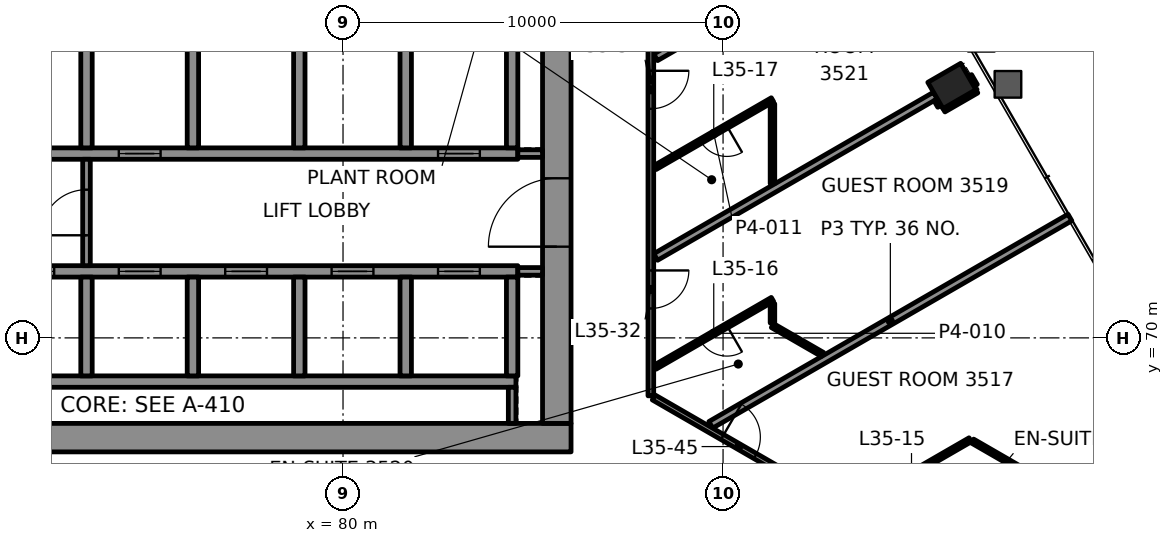
"""IFC4 building model, lengths in metres.
Left out: names, types, materials, properties, quantities, classifications, styles, units other than length and angle.
Written with IfcOpenShell. Run it as: python <this file> out.ifc"""

import sys

from ifc_helpers import new_model, si_unit, direction, frame, frame_2d, origin, origin_2d, place, context, subcontext, project, spatial, rectangle, hollow_rectangle, extrude, element, fill, save


model = new_model("IFC4")
c1 = context("Model", 3, precision=1e-05, world=origin(), true_north=direction((0.0, 1.0)))
c2 = subcontext(c1, "Body", "Model", "MODEL_VIEW")
j1 = project(units=[si_unit("LENGTHUNIT", "METRE"), si_unit("PLANEANGLEUNIT", "RADIAN")], contexts=[c1])
p1 = place(None, origin())
s1 = spatial("IfcSite", under=j1, at=p1, CompositionType="ELEMENT")
p2 = place(p1, origin())
s2 = spatial("IfcBuilding", under=s1, at=p2, CompositionType="ELEMENT")
p3 = place(p2, frame((0.0, 0.0, 155.8)))
s3 = spatial("IfcBuildingStorey", under=s2, at=p3, CompositionType="ELEMENT", Elevation=155.8)
p4 = place(p3, frame((96.021, 76.628, -0.0), z_axis=(0.0, 0.0, 1.0), x_axis=(-0.5, 0.866025403784, 0.0)))
e1 = element("IfcColumn", 1, at=p4, inside=s3, PredefinedType="COLUMN", context=c2, shape_type="SweptSolid", body=[
    extrude(hollow_rectangle(XDim=0.8, YDim=1.0, WallThickness=0.05, at=origin_2d()), origin(), (0.0, 0.0, 1.0), 3.9),
])
p5 = place(p3, frame((64.0, 67.375, 0.0), z_axis=(0.0, 0.0, 1.0), x_axis=(1.0, 0.0, 0.0)))
e2 = element("IfcWall", 2, at=p5, inside=s3, PredefinedType="SHEAR", context=c2, shape_type="SweptSolid", body=[
    extrude(rectangle(XDim=22.0, YDim=0.75, at=frame_2d((11.0, 0.0))), origin(), (0.0, 0.0, 1.0), 3.7),
])
p6 = place(p5, frame((3.15, 0.0, 0.0)))
e3 = element("IfcOpeningElement", 3, at=p6, cuts=e2, PredefinedType="OPENING", context=c2, shape_type="SweptSolid", body=[
    extrude(rectangle(XDim=0.9, YDim=2.1, at=frame_2d((0.45, 1.05))), frame((0.0, 0.385, 0.0), z_axis=(0.0, -1.0, 0.0), x_axis=(1.0, 0.0, 0.0)), (0.0, 0.0, 1.0), 0.77),
])
p7 = place(p3, frame((85.625, 67.75, 0.0), z_axis=(0.0, 0.0, 1.0), x_axis=(0.0, 1.0, 0.0)))
e4 = element("IfcWall", 4, at=p7, inside=s3, PredefinedType="SHEAR", context=c2, shape_type="SweptSolid", body=[
    extrude(rectangle(XDim=14.5, YDim=0.75, at=frame_2d((7.25, 0.0))), origin(), (0.0, 0.0, 1.0), 3.7),
])
p8 = place(p7, frame((4.65, 0.0, 0.0)))
e5 = element("IfcOpeningElement", 5, at=p8, cuts=e4, PredefinedType="OPENING", context=c2, shape_type="SweptSolid", body=[
    extrude(rectangle(XDim=1.8, YDim=2.1, at=frame_2d((0.9, 1.05))), frame((0.0, 0.385, 0.0), z_axis=(0.0, -1.0, 0.0), x_axis=(1.0, 0.0, 0.0)), (0.0, 0.0, 1.0), 0.77),
])
p9 = place(p7, frame((11.8, 0.0, 0.0)))
e6 = element("IfcOpeningElement", 6, at=p9, cuts=e4, PredefinedType="OPENING", context=c2, shape_type="SweptSolid", body=[
    extrude(rectangle(XDim=0.9, YDim=2.1, at=frame_2d((0.45, 1.05))), frame((0.0, 0.385, 0.0), z_axis=(0.0, -1.0, 0.0), x_axis=(1.0, 0.0, 0.0)), (0.0, 0.0, 1.0), 0.77),
])
p10 = place(p3, frame((70.35, 68.85, 0.0), z_axis=(0.0, 0.0, 1.0), x_axis=(1.0, 0.0, 0.0)))
e7 = element("IfcWall", 7, at=p10, inside=s3, PredefinedType="SHEAR", context=c2, shape_type="SweptSolid", body=[
    extrude(rectangle(XDim=14.2, YDim=0.3, at=frame_2d((7.1, 0.0))), origin(), (0.0, 0.0, 1.0), 3.7),
])
p11 = place(p3, frame((70.3, 71.75, 0.0), z_axis=(0.0, 0.0, 1.0), x_axis=(1.0, 0.0, 0.0)))
e8 = element("IfcWall", 8, at=p11, inside=s3, PredefinedType="SHEAR", context=c2, shape_type="SweptSolid", body=[
    extrude(rectangle(XDim=14.3, YDim=0.3, at=frame_2d((7.15, 0.0))), origin(), (0.0, 0.0, 1.0), 3.7),
])
p12 = place(p11, frame((1.0, 0.0, 0.0)))
e9 = element("IfcOpeningElement", 9, at=p12, cuts=e8, PredefinedType="OPENING", context=c2, shape_type="SweptSolid", body=[
    extrude(rectangle(XDim=1.1, YDim=2.1, at=frame_2d((0.55, 1.05))), frame((0.0, 0.16, 0.0), z_axis=(0.0, -1.0, 0.0), x_axis=(1.0, 0.0, 0.0)), (0.0, 0.0, 1.0), 0.32),
])
p13 = place(p11, frame((3.8, 0.0, 0.0)))
e10 = element("IfcOpeningElement", 10, at=p13, cuts=e8, PredefinedType="OPENING", context=c2, shape_type="SweptSolid", body=[
    extrude(rectangle(XDim=1.1, YDim=2.1, at=frame_2d((0.55, 1.05))), frame((0.0, 0.16, 0.0), z_axis=(0.0, -1.0, 0.0), x_axis=(1.0, 0.0, 0.0)), (0.0, 0.0, 1.0), 0.32),
])
p14 = place(p11, frame((6.6, 0.0, 0.0)))
e11 = element("IfcOpeningElement", 11, at=p14, cuts=e8, PredefinedType="OPENING", context=c2, shape_type="SweptSolid", body=[
    extrude(rectangle(XDim=1.1, YDim=2.1, at=frame_2d((0.55, 1.05))), frame((0.0, 0.16, 0.0), z_axis=(0.0, -1.0, 0.0), x_axis=(1.0, 0.0, 0.0)), (0.0, 0.0, 1.0), 0.32),
])
p15 = place(p11, frame((9.4, 0.0, 0.0)))
e12 = element("IfcOpeningElement", 12, at=p15, cuts=e8, PredefinedType="OPENING", context=c2, shape_type="SweptSolid", body=[
    extrude(rectangle(XDim=1.1, YDim=2.1, at=frame_2d((0.55, 1.05))), frame((0.0, 0.16, 0.0), z_axis=(0.0, -1.0, 0.0), x_axis=(1.0, 0.0, 0.0)), (0.0, 0.0, 1.0), 0.32),
])
p16 = place(p11, frame((12.2, 0.0, 0.0)))
e13 = element("IfcOpeningElement", 13, at=p16, cuts=e8, PredefinedType="OPENING", context=c2, shape_type="SweptSolid", body=[
    extrude(rectangle(XDim=1.1, YDim=2.1, at=frame_2d((0.55, 1.05))), frame((0.0, 0.16, 0.0), z_axis=(0.0, -1.0, 0.0), x_axis=(1.0, 0.0, 0.0)), (0.0, 0.0, 1.0), 0.32),
])
p17 = place(p3, frame((70.3, 74.85, 0.0), z_axis=(0.0, 0.0, 1.0), x_axis=(1.0, 0.0, 0.0)))
e14 = element("IfcWall", 14, at=p17, inside=s3, PredefinedType="SHEAR", context=c2, shape_type="SweptSolid", body=[
    extrude(rectangle(XDim=14.3, YDim=0.3, at=frame_2d((7.15, 0.0))), origin(), (0.0, 0.0, 1.0), 3.7),
])
p18 = place(p17, frame((3.8, 0.0, 0.0)))
e15 = element("IfcOpeningElement", 15, at=p18, cuts=e14, PredefinedType="OPENING", context=c2, shape_type="SweptSolid", body=[
    extrude(rectangle(XDim=1.1, YDim=2.1, at=frame_2d((0.55, 1.05))), frame((0.0, 0.16, 0.0), z_axis=(0.0, -1.0, 0.0), x_axis=(1.0, 0.0, 0.0)), (0.0, 0.0, 1.0), 0.32),
])
p19 = place(p17, frame((12.2, 0.0, 0.0)))
e16 = element("IfcOpeningElement", 16, at=p19, cuts=e14, PredefinedType="OPENING", context=c2, shape_type="SweptSolid", body=[
    extrude(rectangle(XDim=1.1, YDim=2.1, at=frame_2d((0.55, 1.05))), frame((0.0, 0.16, 0.0), z_axis=(0.0, -1.0, 0.0), x_axis=(1.0, 0.0, 0.0)), (0.0, 0.0, 1.0), 0.32),
])
for number, where, z_axis, x_axis in (
    (17, (73.25, 69.0, 0.0), (0.0, 0.0, 1.0), (0.0, 1.0, 0.0)),
    (18, (73.25, 75.0, 0.0), (0.0, 0.0, 1.0), (0.0, 1.0, 0.0)),
    (19, (76.05, 69.0, 0.0), (0.0, 0.0, 1.0), (0.0, 1.0, 0.0)),
    (20, (76.05, 75.0, 0.0), (0.0, 0.0, 1.0), (0.0, 1.0, 0.0)),
    (21, (78.85, 69.0, 0.0), (0.0, 0.0, 1.0), (0.0, 1.0, 0.0)),
    (22, (78.85, 75.0, 0.0), (0.0, 0.0, 1.0), (0.0, 1.0, 0.0)),
    (23, (81.65, 69.0, 0.0), (0.0, 0.0, 1.0), (0.0, 1.0, 0.0)),
    (24, (81.65, 75.0, 0.0), (0.0, 0.0, 1.0), (0.0, 1.0, 0.0)),
    (25, (84.45, 69.0, 0.0), (0.0, 0.0, 1.0), (0.0, 1.0, 0.0)),
    (26, (84.45, 75.0, 0.0), (0.0, 0.0, 1.0), (0.0, 1.0, 0.0)),
):
    element("IfcWall", number, at=place(p3, frame(where, z_axis=z_axis, x_axis=x_axis)), inside=s3, PredefinedType="SHEAR", context=c2, shape_type="SweptSolid", body=[
        extrude(rectangle(XDim=2.6, YDim=0.3, at=frame_2d((1.3, 0.0))), origin(), (0.0, 0.0, 1.0), 3.7),
    ])
p20 = place(p3, frame((96.502, 63.772, 0.0), z_axis=(0.0, 0.0, 1.0), x_axis=(0.866014709899, 0.500018521895, 0.0)))
e27 = element("IfcWall", 27, at=p20, inside=s3, PredefinedType="PARTITIONING", context=c2, shape_type="SweptSolid", body=[
    extrude(rectangle(XDim=6.971, YDim=0.2, at=frame_2d((3.486, 0.0))), origin(), (0.0, 0.0, 1.0), 3.1),
])
p21 = place(p3, frame((96.504, 67.319, 0.0), z_axis=(0.0, 0.0, 1.0), x_axis=(-0.866028357664, -0.499994883695, 0.0)))
e28 = element("IfcWall", 28, at=p21, inside=s3, PredefinedType="PARTITIONING", context=c2, shape_type="SweptSolid", body=[
    extrude(rectangle(XDim=3.568, YDim=0.12, at=frame_2d((1.784, 0.0))), origin(), (0.0, 0.0, 1.0), 3.1),
])
p22 = place(p21, frame((1.384, 0.0, 0.0)))
e29 = element("IfcOpeningElement", 29, at=p22, cuts=e28, PredefinedType="OPENING", context=c2, shape_type="SweptSolid", body=[
    extrude(rectangle(XDim=0.8, YDim=2.1, at=frame_2d((0.4, 1.05))), frame((0.0, 0.07, 0.0), z_axis=(0.0, -1.0, 0.0), x_axis=(1.0, 0.0, 0.0)), (0.0, 0.0, 1.0), 0.14),
])
p23 = place(p3, frame((89.677, 67.712, 0.0), z_axis=(0.0, 0.0, 1.0), x_axis=(0.866020529357, 0.500008442661, 0.0)))
e30 = element("IfcWall", 30, at=p23, inside=s3, PredefinedType="PARTITIONING", context=c2, shape_type="SweptSolid", body=[
    extrude(rectangle(XDim=10.912, YDim=0.2, at=frame_2d((5.456, 0.0))), origin(), (0.0, 0.0, 1.0), 2.865),
])
p24 = place(p3, frame((91.3, 71.013, 0.0), z_axis=(0.0, 0.0, 1.0), x_axis=(-0.866028357664, -0.499994883695, 0.0)))
e31 = element("IfcWall", 31, at=p24, inside=s3, PredefinedType="PARTITIONING", context=c2, shape_type="SweptSolid", body=[
    extrude(rectangle(XDim=3.568, YDim=0.12, at=frame_2d((1.784, 0.0))), origin(), (0.0, 0.0, 1.0), 3.1),
])
p25 = place(p24, frame((1.384, 0.0, 0.0)))
e32 = element("IfcOpeningElement", 32, at=p25, cuts=e31, PredefinedType="OPENING", context=c2, shape_type="SweptSolid", body=[
    extrude(rectangle(XDim=0.8, YDim=2.1, at=frame_2d((0.4, 1.05))), frame((0.0, 0.07, 0.0), z_axis=(0.0, -1.0, 0.0), x_axis=(1.0, 0.0, 0.0)), (0.0, 0.0, 1.0), 0.14),
])
p26 = place(p3, frame((95.788, 76.032, 0.0), z_axis=(0.0, 0.0, 1.0), x_axis=(0.866039090965, 0.499976292358, 0.0)))
e33 = element("IfcWall", 33, at=p26, inside=s3, PredefinedType="PARTITIONING", context=c2, shape_type="SweptSolid", body=[
    extrude(rectangle(XDim=0.999, YDim=0.2, at=frame_2d((0.5, 0.0))), origin(), (0.0, 0.0, 1.0), 2.865),
])
p27 = place(p3, frame((88.227, 72.129, 0.0), z_axis=(0.0, 0.0, 1.0), x_axis=(0.866037293988, 0.499979404997, 0.0)))
e34 = element("IfcWall", 34, at=p27, inside=s3, PredefinedType="PARTITIONING", context=c2, shape_type="SweptSolid", body=[
    extrude(rectangle(XDim=8.499, YDim=0.2, at=frame_2d((4.25, 0.0))), origin(), (0.0, 0.0, 1.0), 3.1),
])
p28 = place(p3, frame((91.3, 76.267, 0.0), z_axis=(0.0, 0.0, 1.0), x_axis=(-0.866028357664, -0.499994883695, 0.0)))
e35 = element("IfcWall", 35, at=p28, inside=s3, PredefinedType="PARTITIONING", context=c2, shape_type="SweptSolid", body=[
    extrude(rectangle(XDim=3.568, YDim=0.12, at=frame_2d((1.784, 0.0))), origin(), (0.0, 0.0, 1.0), 3.1),
])
p29 = place(p28, frame((1.384, 0.0, 0.0)))
e36 = element("IfcOpeningElement", 36, at=p29, cuts=e35, PredefinedType="OPENING", context=c2, shape_type="SweptSolid", body=[
    extrude(rectangle(XDim=0.8, YDim=2.1, at=frame_2d((0.4, 1.05))), frame((0.0, 0.07, 0.0), z_axis=(0.0, -1.0, 0.0), x_axis=(1.0, 0.0, 0.0)), (0.0, 0.0, 1.0), 0.14),
])
p30 = place(p3, frame((88.227, 77.383, 0.0), z_axis=(0.0, 0.0, 1.0), x_axis=(0.866023680911, 0.500002984092, 0.0)))
e37 = element("IfcWall", 37, at=p30, inside=s3, PredefinedType="PARTITIONING", context=c2, shape_type="SweptSolid", body=[
    extrude(rectangle(XDim=7.333, YDim=0.2, at=frame_2d((3.666, 0.0))), origin(), (0.0, 0.0, 1.0), 2.865),
])
p31 = place(p3, frame((91.3, 70.393, 0.0), z_axis=(0.0, 0.0, 1.0), x_axis=(0.0, 1.0, 0.0)))
e38 = element("IfcWall", 38, at=p31, inside=s3, PredefinedType="PARTITIONING", context=c2, shape_type="SweptSolid", body=[
    extrude(rectangle(XDim=0.511, YDim=0.12, at=frame_2d((0.256, 0.0))), origin(), (0.0, 0.0, 1.0), 3.1),
])
p32 = place(p3, frame((91.3, 74.059, 0.0), z_axis=(0.0, 0.0, 1.0), x_axis=(0.0, 1.0, 0.0)))
e39 = element("IfcWall", 39, at=p32, inside=s3, PredefinedType="PARTITIONING", context=c2, shape_type="SweptSolid", body=[
    extrude(rectangle(XDim=2.099, YDim=0.12, at=frame_2d((1.05, 0.0))), origin(), (0.0, 0.0, 1.0), 3.1),
])
p33 = place(p3, frame((88.1, 85.1, 0.0), z_axis=(0.0, 0.0, 1.0), x_axis=(0.0, -1.0, 0.0)))
e40 = element("IfcWall", 40, at=p33, inside=s3, PredefinedType="PARTITIONING", context=c2, shape_type="SweptSolid", body=[
    extrude(rectangle(XDim=16.624, YDim=0.15, at=frame_2d((8.312, 0.0))), origin(), (0.0, 0.0, 1.0), 3.1),
])
p34 = place(p33, frame((0.657, 0.0, 0.0)))
e41 = element("IfcOpeningElement", 41, at=p34, cuts=e40, PredefinedType="OPENING", context=c2, shape_type="SweptSolid", body=[
    extrude(rectangle(XDim=1.0, YDim=2.1, at=frame_2d((0.5, 1.05))), frame((0.0, 0.085, 0.0), z_axis=(0.0, -1.0, 0.0), x_axis=(1.0, 0.0, 0.0)), (0.0, 0.0, 1.0), 0.17),
])
p35 = place(p33, frame((8.071, 0.0, 0.0)))
e42 = element("IfcOpeningElement", 42, at=p35, cuts=e40, PredefinedType="OPENING", context=c2, shape_type="SweptSolid", body=[
    extrude(rectangle(XDim=1.0, YDim=2.1, at=frame_2d((0.5, 1.05))), frame((0.0, 0.085, 0.0), z_axis=(0.0, -1.0, 0.0), x_axis=(1.0, 0.0, 0.0)), (0.0, 0.0, 1.0), 0.17),
])
p36 = place(p33, frame((13.325, 0.0, 0.0)))
e43 = element("IfcOpeningElement", 43, at=p36, cuts=e40, PredefinedType="OPENING", context=c2, shape_type="SweptSolid", body=[
    extrude(rectangle(XDim=1.0, YDim=2.1, at=frame_2d((0.5, 1.05))), frame((0.0, 0.085, 0.0), z_axis=(0.0, -1.0, 0.0), x_axis=(1.0, 0.0, 0.0)), (0.0, 0.0, 1.0), 0.17),
])
p37 = place(p3, frame((96.603, 76.619, 0.0), z_axis=(0.0, 0.0, 1.0), x_axis=(-0.500617711777, 0.865668473872, 0.0)))
e44 = element("IfcWall", 44, at=p37, inside=s3, PredefinedType="PARTITIONING", context=c2, shape_type="SweptSolid", body=[
    extrude(rectangle(XDim=0.299, YDim=0.2, at=frame_2d((0.149, 0.0))), origin(), (0.0, 0.0, 1.0), 3.1),
])
p38 = place(p3, frame((95.737, 76.119, 0.0), z_axis=(0.0, 0.0, 1.0), x_axis=(-0.499439139722, 0.866348974555, 0.0)))
e45 = element("IfcWall", 45, at=p38, inside=s3, PredefinedType="PARTITIONING", context=c2, shape_type="SweptSolid", body=[
    extrude(rectangle(XDim=0.199, YDim=0.2, at=frame_2d((0.1, 0.0))), origin(), (0.0, 0.0, 1.0), 3.1),
])
p39 = place(p3, frame((99.44, 65.624, 0.0), z_axis=(0.0, 0.0, 1.0), x_axis=(-0.866054626172, 0.499949381925, 0.0)))
e46 = element("IfcWall", 46, at=p39, inside=s3, PredefinedType="PARTITIONING", context=c2, shape_type="SweptSolid", body=[
    extrude(rectangle(XDim=3.322, YDim=0.12, at=frame_2d((1.661, 0.0))), origin(), (0.0, 0.0, 1.0), 3.1),
])
p40 = place(p3, frame((92.615, 69.564, 0.0), z_axis=(0.0, 0.0, 1.0), x_axis=(-0.866078523702, 0.499907982315, 0.0)))
e47 = element("IfcWall", 47, at=p40, inside=s3, PredefinedType="PARTITIONING", context=c2, shape_type="SweptSolid", body=[
    extrude(rectangle(XDim=1.519, YDim=0.12, at=frame_2d((0.759, 0.0))), origin(), (0.0, 0.0, 1.0), 3.1),
])
p41 = place(p3, frame((88.175, 68.433, 0.0), z_axis=(0.0, 0.0, 1.0), x_axis=(0.866028999927, -0.499993771247, 0.0)))
e48 = element("IfcWall", 48, at=p41, inside=s3, PredefinedType="PARTITIONING", context=c2, shape_type="SweptSolid", body=[
    extrude(rectangle(XDim=15.708, YDim=0.15, at=frame_2d((7.854, 0.0))), origin(), (0.0, 0.0, 1.0), 3.1),
])
p42 = place(p41, frame((2.086, 0.0, 0.0)))
e49 = element("IfcOpeningElement", 49, at=p42, cuts=e48, PredefinedType="OPENING", context=c2, shape_type="SweptSolid", body=[
    extrude(rectangle(XDim=1.0, YDim=2.1, at=frame_2d((0.5, 1.05))), frame((0.0, 0.085, 0.0), z_axis=(0.0, -1.0, 0.0), x_axis=(1.0, 0.0, 0.0)), (0.0, 0.0, 1.0), 0.17),
])
p43 = place(p41, frame((10.222, 0.0, 0.0)))
e50 = element("IfcOpeningElement", 50, at=p43, cuts=e48, PredefinedType="OPENING", context=c2, shape_type="SweptSolid", body=[
    extrude(rectangle(XDim=1.0, YDim=2.1, at=frame_2d((0.5, 1.05))), frame((0.0, 0.085, 0.0), z_axis=(0.0, -1.0, 0.0), x_axis=(1.0, 0.0, 0.0)), (0.0, 0.0, 1.0), 0.17),
])
for number, where, z_axis, x_axis in (
    (51, (84.6, 71.75, 0.0), (0.0, 0.0, 1.0), (1.0, 0.0, 0.0)),
    (52, (84.6, 74.85, 0.0), (0.0, 0.0, 1.0), (1.0, 0.0, 0.0)),
):
    element("IfcWall", number, at=place(p3, frame(where, z_axis=z_axis, x_axis=x_axis)), inside=s3, PredefinedType="PARTITIONING", context=c2, shape_type="SweptSolid", body=[
        extrude(rectangle(XDim=0.65, YDim=0.2, at=frame_2d((0.325, 0.0))), origin(), (0.0, 0.0, 1.0), 3.7),
    ])
p44 = place(p3, frame((73.25, 71.9, 0.0), z_axis=(0.0, 0.0, 1.0), x_axis=(0.0, 1.0, 0.0)))
e53 = element("IfcWall", 53, at=p44, inside=s3, PredefinedType="PARTITIONING", context=c2, shape_type="SweptSolid", body=[
    extrude(rectangle(XDim=2.8, YDim=0.2, at=frame_2d((1.4, 0.0))), origin(), (0.0, 0.0, 1.0), 3.7),
])
p45 = place(p44, frame((0.8, 0.0, 0.0)))
e54 = element("IfcOpeningElement", 54, at=p45, cuts=e53, PredefinedType="OPENING", context=c2, shape_type="SweptSolid", body=[
    extrude(rectangle(XDim=1.2, YDim=2.1, at=frame_2d((0.6, 1.05))), frame((0.0, 0.11, 0.0), z_axis=(0.0, -1.0, 0.0), x_axis=(1.0, 0.0, 0.0)), (0.0, 0.0, 1.0), 0.22),
])
p46 = place(p3, frame((84.45, 67.75, 0.0), z_axis=(0.0, 0.0, 1.0), x_axis=(0.0, 1.0, 0.0)))
e55 = element("IfcWall", 55, at=p46, inside=s3, PredefinedType="PARTITIONING", context=c2, shape_type="SweptSolid", body=[
    extrude(rectangle(XDim=0.95, YDim=0.2, at=frame_2d((0.475, 0.0))), origin(), (0.0, 0.0, 1.0), 3.7),
])
p47 = place(p25, origin())
e56 = element("IfcDoor", 56, at=p47, inside=s3, OperationType="SINGLE_SWING_RIGHT", PredefinedType="DOOR", context=c2, shape_type="SweptSolid", body=[
    extrude(rectangle(XDim=0.8, YDim=2.1, at=frame_2d((0.4, 1.05))), frame((0.0, 0.025, 0.0), z_axis=(0.0, -1.0, 0.0), x_axis=(1.0, 0.0, 0.0)), (0.0, 0.0, 1.0), 0.05),
])
fill(e32, e56)
p48 = place(p29, origin())
e57 = element("IfcDoor", 57, at=p48, inside=s3, OperationType="SINGLE_SWING_RIGHT", PredefinedType="DOOR", context=c2, shape_type="SweptSolid", body=[
    extrude(rectangle(XDim=0.8, YDim=2.1, at=frame_2d((0.4, 1.05))), frame((0.0, 0.025, 0.0), z_axis=(0.0, -1.0, 0.0), x_axis=(1.0, 0.0, 0.0)), (0.0, 0.0, 1.0), 0.05),
])
fill(e36, e57)
p49 = place(p35, origin())
e58 = element("IfcDoor", 58, at=p49, inside=s3, OperationType="SINGLE_SWING_LEFT", PredefinedType="DOOR", context=c2, shape_type="SweptSolid", body=[
    extrude(rectangle(XDim=1.0, YDim=2.1, at=frame_2d((0.5, 1.05))), frame((0.0, 0.025, 0.0), z_axis=(0.0, -1.0, 0.0), x_axis=(1.0, 0.0, 0.0)), (0.0, 0.0, 1.0), 0.05),
])
fill(e42, e58)
p50 = place(p36, origin())
e59 = element("IfcDoor", 59, at=p50, inside=s3, OperationType="SINGLE_SWING_LEFT", PredefinedType="DOOR", context=c2, shape_type="SweptSolid", body=[
    extrude(rectangle(XDim=1.0, YDim=2.1, at=frame_2d((0.5, 1.05))), frame((0.0, 0.025, 0.0), z_axis=(0.0, -1.0, 0.0), x_axis=(1.0, 0.0, 0.0)), (0.0, 0.0, 1.0), 0.05),
])
fill(e43, e59)
p51 = place(p42, origin())
e60 = element("IfcDoor", 60, at=p51, inside=s3, OperationType="SINGLE_SWING_LEFT", PredefinedType="DOOR", context=c2, shape_type="SweptSolid", body=[
    extrude(rectangle(XDim=1.0, YDim=2.1, at=frame_2d((0.5, 1.05))), frame((0.0, 0.025, 0.0), z_axis=(0.0, -1.0, 0.0), x_axis=(1.0, 0.0, 0.0)), (0.0, 0.0, 1.0), 0.05),
])
fill(e49, e60)
p52 = place(p12, origin())
e61 = element("IfcDoor", 61, at=p52, inside=s3, OperationType="DOUBLE_DOOR_SLIDING", PredefinedType="DOOR", context=c2, shape_type="SweptSolid", body=[
    extrude(rectangle(XDim=1.1, YDim=2.1, at=frame_2d((0.55, 1.05))), frame((0.0, 0.025, 0.0), z_axis=(0.0, -1.0, 0.0), x_axis=(1.0, 0.0, 0.0)), (0.0, 0.0, 1.0), 0.05),
])
fill(e9, e61)
p53 = place(p13, origin())
e62 = element("IfcDoor", 62, at=p53, inside=s3, OperationType="DOUBLE_DOOR_SLIDING", PredefinedType="DOOR", context=c2, shape_type="SweptSolid", body=[
    extrude(rectangle(XDim=1.1, YDim=2.1, at=frame_2d((0.55, 1.05))), frame((0.0, 0.025, 0.0), z_axis=(0.0, -1.0, 0.0), x_axis=(1.0, 0.0, 0.0)), (0.0, 0.0, 1.0), 0.05),
])
fill(e10, e62)
p54 = place(p14, origin())
e63 = element("IfcDoor", 63, at=p54, inside=s3, OperationType="DOUBLE_DOOR_SLIDING", PredefinedType="DOOR", context=c2, shape_type="SweptSolid", body=[
    extrude(rectangle(XDim=1.1, YDim=2.1, at=frame_2d((0.55, 1.05))), frame((0.0, 0.025, 0.0), z_axis=(0.0, -1.0, 0.0), x_axis=(1.0, 0.0, 0.0)), (0.0, 0.0, 1.0), 0.05),
])
fill(e11, e63)
p55 = place(p15, origin())
e64 = element("IfcDoor", 64, at=p55, inside=s3, OperationType="DOUBLE_DOOR_SLIDING", PredefinedType="DOOR", context=c2, shape_type="SweptSolid", body=[
    extrude(rectangle(XDim=1.1, YDim=2.1, at=frame_2d((0.55, 1.05))), frame((0.0, 0.025, 0.0), z_axis=(0.0, -1.0, 0.0), x_axis=(1.0, 0.0, 0.0)), (0.0, 0.0, 1.0), 0.05),
])
fill(e12, e64)
p56 = place(p16, origin())
e65 = element("IfcDoor", 65, at=p56, inside=s3, OperationType="DOUBLE_DOOR_SLIDING", PredefinedType="DOOR", context=c2, shape_type="SweptSolid", body=[
    extrude(rectangle(XDim=1.1, YDim=2.1, at=frame_2d((0.55, 1.05))), frame((0.0, 0.025, 0.0), z_axis=(0.0, -1.0, 0.0), x_axis=(1.0, 0.0, 0.0)), (0.0, 0.0, 1.0), 0.05),
])
fill(e13, e65)
p57 = place(p18, origin())
e66 = element("IfcDoor", 66, at=p57, inside=s3, OperationType="DOUBLE_DOOR_SLIDING", PredefinedType="DOOR", context=c2, shape_type="SweptSolid", body=[
    extrude(rectangle(XDim=1.1, YDim=2.1, at=frame_2d((0.55, 1.05))), frame((0.0, 0.025, 0.0), z_axis=(0.0, -1.0, 0.0), x_axis=(1.0, 0.0, 0.0)), (0.0, 0.0, 1.0), 0.05),
])
fill(e15, e66)
p58 = place(p19, origin())
e67 = element("IfcDoor", 67, at=p58, inside=s3, OperationType="DOUBLE_DOOR_SLIDING", PredefinedType="DOOR", context=c2, shape_type="SweptSolid", body=[
    extrude(rectangle(XDim=1.1, YDim=2.1, at=frame_2d((0.55, 1.05))), frame((0.0, 0.025, 0.0), z_axis=(0.0, -1.0, 0.0), x_axis=(1.0, 0.0, 0.0)), (0.0, 0.0, 1.0), 0.05),
])
fill(e16, e67)
p59 = place(p45, origin())
e68 = element("IfcDoor", 68, at=p59, inside=s3, OperationType="SINGLE_SWING_LEFT", PredefinedType="DOOR", context=c2, shape_type="SweptSolid", body=[
    extrude(rectangle(XDim=1.2, YDim=2.1, at=frame_2d((0.6, 1.05))), frame((0.0, 0.025, 0.0), z_axis=(0.0, -1.0, 0.0), x_axis=(1.0, 0.0, 0.0)), (0.0, 0.0, 1.0), 0.05),
])
fill(e54, e68)
p60 = place(p8, origin())
e69 = element("IfcDoor", 69, at=p60, inside=s3, OperationType="SINGLE_SWING_RIGHT", PredefinedType="DOOR", context=c2, shape_type="SweptSolid", body=[
    extrude(rectangle(XDim=1.8, YDim=2.1, at=frame_2d((0.9, 1.05))), frame((0.0, 0.095, 0.0), z_axis=(0.0, -1.0, 0.0), x_axis=(1.0, 0.0, 0.0)), (0.0, 0.0, 1.0), 0.19),
])
fill(e5, e69)
save(model, sys.argv[1])
